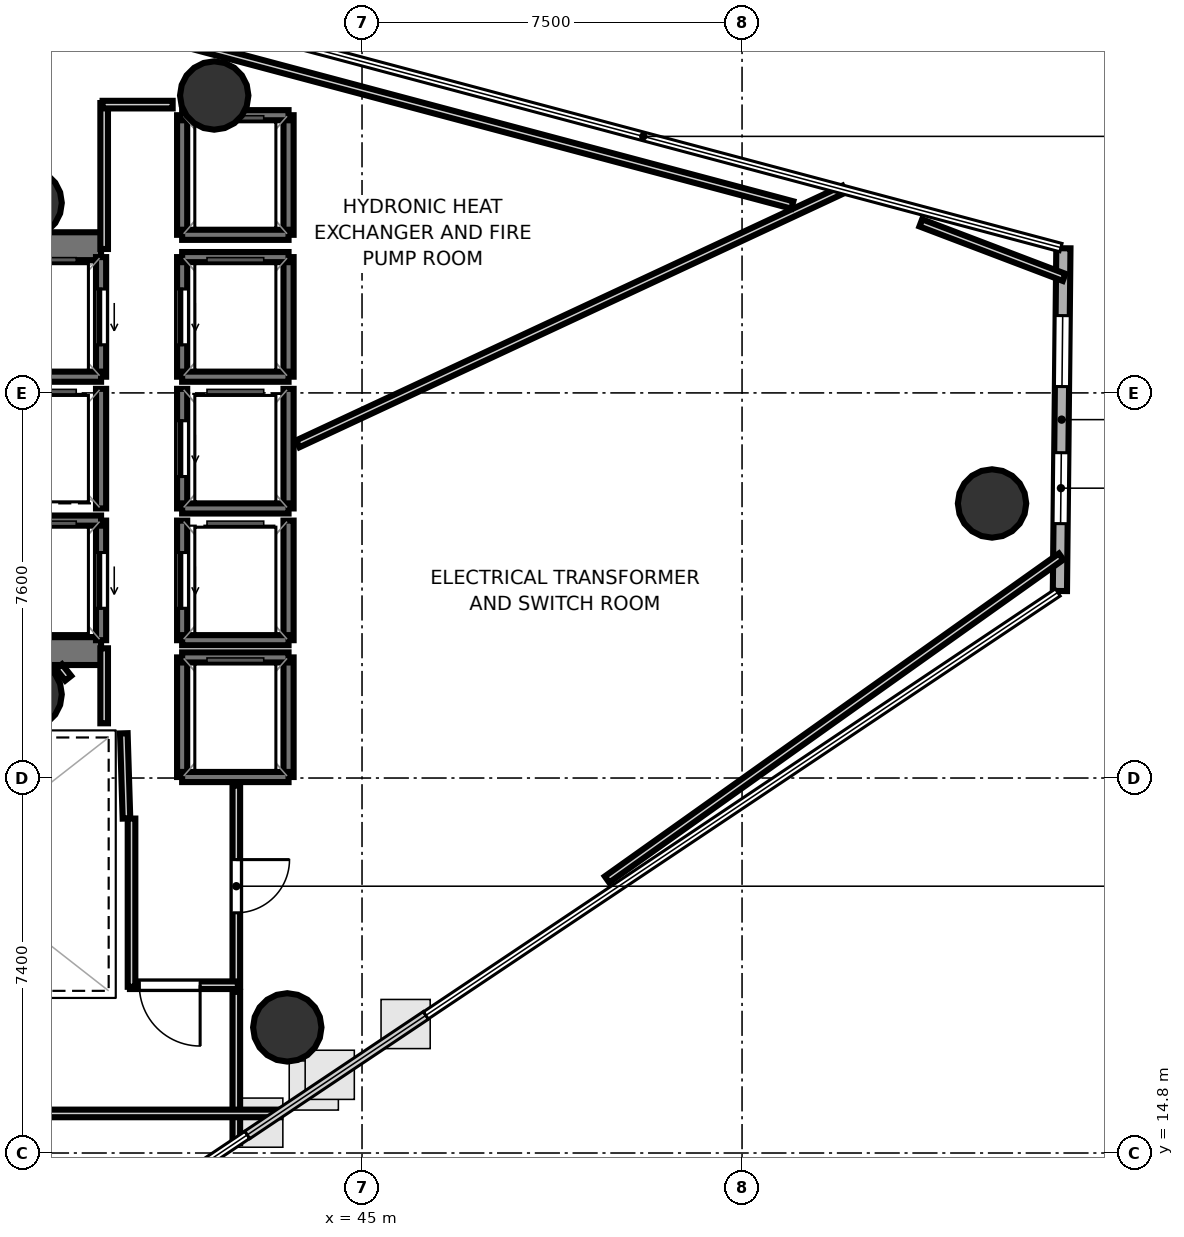
"""IFC4 building model, lengths in metres.
Left out: names, types, materials, properties, quantities, classifications, styles, units other than length and angle.
Written with IfcOpenShell. Run it as: python <this file> out.ifc"""

import sys

from ifc_helpers import new_model, si_unit, direction, frame, frame_2d, origin, origin_2d, place, context, subcontext, project, spatial, rectangle, hollow_circle, extrude, element, fill, save


model = new_model("IFC4")
c1 = context("Model", 3, precision=1e-05, world=origin(), true_north=direction((0.0, 1.0)))
c2 = subcontext(c1, "Body", "Model", "MODEL_VIEW")
j1 = project(units=[si_unit("LENGTHUNIT", "METRE"), si_unit("PLANEANGLEUNIT", "RADIAN")], contexts=[c1])
p1 = place(None, origin())
s1 = spatial("IfcSite", under=j1, at=p1, CompositionType="ELEMENT")
p2 = place(p1, origin())
s2 = spatial("IfcBuilding", under=s1, at=p2, CompositionType="ELEMENT")
p3 = place(p2, frame((0.0, 0.0, 184.6)))
s3 = spatial("IfcBuildingStorey", under=s2, at=p3, CompositionType="ELEMENT", Elevation=184.6)
p4 = place(p3, frame((29.23, 32.695, 0.0), z_axis=(0.0, 0.0, 1.0), x_axis=(1.0, 0.0, 0.0)))
e1 = element("IfcWall", 1, at=p4, inside=s3, PredefinedType="SHEAR", context=c2, shape_type="SweptSolid", body=[
    extrude(rectangle(XDim=10.62, YDim=0.55, at=frame_2d((5.31, 0.0))), origin(), (0.0, 0.0, 1.0), 4.42),
])
p5 = place(p4, frame((0.995, 0.0, 0.0)))
e2 = element("IfcOpeningElement", 2, at=p5, cuts=e1, PredefinedType="OPENING", context=c2, shape_type="SweptSolid", body=[
    extrude(rectangle(XDim=1.25, YDim=2.15, at=frame_2d((0.625, 1.075))), frame((0.0, 0.285, 0.0), z_axis=(0.0, -1.0, 0.0), x_axis=(1.0, 0.0, 0.0)), (0.0, 0.0, 1.0), 0.57),
])
p6 = place(p3, frame((29.23, 24.705, 0.0), z_axis=(0.0, 0.0, 1.0), x_axis=(1.0, 0.0, 0.0)))
e3 = element("IfcWall", 3, at=p6, inside=s3, PredefinedType="SHEAR", context=c2, shape_type="SweptSolid", body=[
    extrude(rectangle(XDim=10.62, YDim=0.55, at=frame_2d((5.31, 0.0))), origin(), (0.0, 0.0, 1.0), 4.42),
])
p7 = place(p6, frame((0.795, 0.0, 0.0)))
e4 = element("IfcOpeningElement", 4, at=p7, cuts=e3, PredefinedType="OPENING", context=c2, shape_type="SweptSolid", body=[
    extrude(rectangle(XDim=1.25, YDim=2.15, at=frame_2d((0.625, 1.075))), frame((0.0, 0.285, 0.0), z_axis=(0.0, -1.0, 0.0), x_axis=(1.0, 0.0, 0.0)), (0.0, 0.0, 1.0), 0.57),
])
for number, where, z_axis, x_axis in (
    (5, (38.4, 33.55, 0.0), (0.0, 0.0, 1.0), (1.0, 0.0, 0.0)),
    (6, (38.4, 23.85, 0.0), (0.0, 0.0, 1.0), (1.0, 0.0, 0.0)),
    (7, (57.434, 27.618, 0.0), (0.0, 0.0, 1.0), (1.0, 0.0, 0.0)),
    (8, (42.083, 35.669, 0.0), (0.0, 0.0, 1.0), (1.0, 0.0, 0.0)),
    (9, (43.525, 17.279, 0.0), (0.0, 0.0, 1.0), (1.0, 0.0, 0.0)),
):
    element("IfcColumn", number, at=place(p3, frame(where, z_axis=z_axis, x_axis=x_axis)), inside=s3, PredefinedType="COLUMN", context=c2, shape_type="SweptSolid", body=[
        extrude(hollow_circle(Radius=0.675, WallThickness=0.032, at=origin_2d()), origin(), (0.0, 0.0, 1.0), 4.6),
    ])
p8 = place(p3, frame((58.773, 25.891, 0.0), z_axis=(0.0, 0.0, 1.0), x_axis=(0.010178875598, 0.999948193904, 0.0)))
e10 = element("IfcWall", 10, at=p8, inside=s3, PredefinedType="SOLIDWALL", context=c2, shape_type="SweptSolid", body=[
    extrude(rectangle(XDim=6.764, YDim=0.28, at=frame_2d((3.382, 0.0))), origin(), (0.0, 0.0, 1.0), 4.42),
])
p9 = place(p8, frame((1.329, 0.0, 1.0)))
e11 = element("IfcOpeningElement", 11, at=p9, cuts=e10, PredefinedType="OPENING", context=c2, shape_type="SweptSolid", body=[
    extrude(rectangle(XDim=1.4, YDim=1.5, at=frame_2d((0.7, 0.75))), frame((0.0, 0.15, 0.0), z_axis=(0.0, -1.0, 0.0), x_axis=(1.0, 0.0, 0.0)), (0.0, 0.0, 1.0), 0.3),
])
p10 = place(p8, frame((4.035, 0.0, 1.0)))
e12 = element("IfcOpeningElement", 12, at=p10, cuts=e10, PredefinedType="OPENING", context=c2, shape_type="SweptSolid", body=[
    extrude(rectangle(XDim=1.4, YDim=1.5, at=frame_2d((0.7, 0.75))), frame((0.0, 0.15, 0.0), z_axis=(0.0, -1.0, 0.0), x_axis=(1.0, 0.0, 0.0)), (0.0, 0.0, 1.0), 0.3),
])
p11 = place(p3, frame((39.85, 30.12, 0.0), z_axis=(0.0, 0.0, 1.0), x_axis=(0.0, 1.0, 0.0)))
e13 = element("IfcWall", 13, at=p11, inside=s3, PredefinedType="SOLIDWALL", context=c2, shape_type="SweptSolid", body=[
    extrude(rectangle(XDim=2.36, YDim=0.2, at=frame_2d((1.18, 0.0))), origin(), (0.0, 0.0, 1.0), 4.42),
])
p12 = place(p11, frame((0.63, 0.0, 0.0)))
e14 = element("IfcOpeningElement", 14, at=p12, cuts=e13, PredefinedType="OPENING", context=c2, shape_type="SweptSolid", body=[
    extrude(rectangle(XDim=1.1, YDim=2.15, at=frame_2d((0.55, 1.075))), frame((0.0, 0.11, 0.0), z_axis=(0.0, -1.0, 0.0), x_axis=(1.0, 0.0, 0.0)), (0.0, 0.0, 1.0), 0.22),
])
p13 = place(p3, frame((37.75, 30.12, 0.0), z_axis=(0.0, 0.0, 1.0), x_axis=(1.0, 0.0, 0.0)))
e15 = element("IfcWall", 15, at=p13, inside=s3, PredefinedType="SOLIDWALL", context=c2, shape_type="SweptSolid", body=[
    extrude(rectangle(XDim=2.1, YDim=0.2, at=frame_2d((1.05, 0.0))), origin(), (0.0, 0.0, 1.0), 4.42),
])
p14 = place(p3, frame((39.85, 24.92, 0.0), z_axis=(0.0, 0.0, 1.0), x_axis=(0.0, 1.0, 0.0)))
e16 = element("IfcWall", 16, at=p14, inside=s3, PredefinedType="SOLIDWALL", context=c2, shape_type="SweptSolid", body=[
    extrude(rectangle(XDim=2.36, YDim=0.2, at=frame_2d((1.18, 0.0))), origin(), (0.0, 0.0, 1.0), 4.42),
])
p15 = place(p14, frame((0.63, 0.0, 0.0)))
e17 = element("IfcOpeningElement", 17, at=p15, cuts=e16, PredefinedType="OPENING", context=c2, shape_type="SweptSolid", body=[
    extrude(rectangle(XDim=1.1, YDim=2.15, at=frame_2d((0.55, 1.075))), frame((0.0, 0.11, 0.0), z_axis=(0.0, -1.0, 0.0), x_axis=(1.0, 0.0, 0.0)), (0.0, 0.0, 1.0), 0.22),
])
p16 = place(p3, frame((37.75, 27.28, 0.0), z_axis=(0.0, 0.0, 1.0), x_axis=(1.0, 0.0, 0.0)))
e18 = element("IfcWall", 18, at=p16, inside=s3, PredefinedType="SOLIDWALL", context=c2, shape_type="SweptSolid", body=[
    extrude(rectangle(XDim=2.1, YDim=0.2, at=frame_2d((1.05, 0.0))), origin(), (0.0, 0.0, 1.0), 4.42),
])
p17 = place(p3, frame((43.55, 30.12, 0.0), z_axis=(0.0, 0.0, 1.0), x_axis=(0.0, 1.0, 0.0)))
e19 = element("IfcWall", 19, at=p17, inside=s3, PredefinedType="SOLIDWALL", context=c2, shape_type="SweptSolid", body=[
    extrude(rectangle(XDim=2.36, YDim=0.2, at=frame_2d((1.18, 0.0))), origin(), (0.0, 0.0, 1.0), 4.42),
])
p18 = place(p3, frame((41.45, 30.12, 0.0), z_axis=(0.0, 0.0, 1.0), x_axis=(0.0, 1.0, 0.0)))
e20 = element("IfcWall", 20, at=p18, inside=s3, PredefinedType="SOLIDWALL", context=c2, shape_type="SweptSolid", body=[
    extrude(rectangle(XDim=2.36, YDim=0.2, at=frame_2d((1.18, 0.0))), origin(), (0.0, 0.0, 1.0), 4.42),
])
p19 = place(p18, frame((0.63, 0.0, 0.0)))
e21 = element("IfcOpeningElement", 21, at=p19, cuts=e20, PredefinedType="OPENING", context=c2, shape_type="SweptSolid", body=[
    extrude(rectangle(XDim=1.1, YDim=2.15, at=frame_2d((0.55, 1.075))), frame((0.0, 0.11, 0.0), z_axis=(0.0, -1.0, 0.0), x_axis=(1.0, 0.0, 0.0)), (0.0, 0.0, 1.0), 0.22),
])
for number, where, z_axis, x_axis in (
    (22, (41.45, 32.48, 0.0), (0.0, 0.0, 1.0), (1.0, 0.0, 0.0)),
    (23, (41.45, 30.12, 0.0), (0.0, 0.0, 1.0), (1.0, 0.0, 0.0)),
):
    element("IfcWall", number, at=place(p3, frame(where, z_axis=z_axis, x_axis=x_axis)), inside=s3, PredefinedType="SOLIDWALL", context=c2, shape_type="SweptSolid", body=[
        extrude(rectangle(XDim=2.1, YDim=0.2, at=frame_2d((1.05, 0.0))), origin(), (0.0, 0.0, 1.0), 4.42),
    ])
p20 = place(p3, frame((43.55, 27.52, 0.0), z_axis=(0.0, 0.0, 1.0), x_axis=(0.0, 1.0, 0.0)))
e24 = element("IfcWall", 24, at=p20, inside=s3, PredefinedType="SOLIDWALL", context=c2, shape_type="SweptSolid", body=[
    extrude(rectangle(XDim=2.36, YDim=0.2, at=frame_2d((1.18, 0.0))), origin(), (0.0, 0.0, 1.0), 4.42),
])
p21 = place(p3, frame((41.45, 27.52, 0.0), z_axis=(0.0, 0.0, 1.0), x_axis=(0.0, 1.0, 0.0)))
e25 = element("IfcWall", 25, at=p21, inside=s3, PredefinedType="SOLIDWALL", context=c2, shape_type="SweptSolid", body=[
    extrude(rectangle(XDim=2.36, YDim=0.2, at=frame_2d((1.18, 0.0))), origin(), (0.0, 0.0, 1.0), 4.42),
])
p22 = place(p21, frame((0.63, 0.0, 0.0)))
e26 = element("IfcOpeningElement", 26, at=p22, cuts=e25, PredefinedType="OPENING", context=c2, shape_type="SweptSolid", body=[
    extrude(rectangle(XDim=1.1, YDim=2.15, at=frame_2d((0.55, 1.075))), frame((0.0, 0.11, 0.0), z_axis=(0.0, -1.0, 0.0), x_axis=(1.0, 0.0, 0.0)), (0.0, 0.0, 1.0), 0.22),
])
p23 = place(p3, frame((41.45, 27.52, 0.0), z_axis=(0.0, 0.0, 1.0), x_axis=(1.0, 0.0, 0.0)))
e27 = element("IfcWall", 27, at=p23, inside=s3, PredefinedType="SOLIDWALL", context=c2, shape_type="SweptSolid", body=[
    extrude(rectangle(XDim=2.1, YDim=0.2, at=frame_2d((1.05, 0.0))), origin(), (0.0, 0.0, 1.0), 4.42),
])
p24 = place(p3, frame((43.55, 24.92, 0.0), z_axis=(0.0, 0.0, 1.0), x_axis=(0.0, 1.0, 0.0)))
e28 = element("IfcWall", 28, at=p24, inside=s3, PredefinedType="SOLIDWALL", context=c2, shape_type="SweptSolid", body=[
    extrude(rectangle(XDim=2.36, YDim=0.2, at=frame_2d((1.18, 0.0))), origin(), (0.0, 0.0, 1.0), 4.42),
])
p25 = place(p3, frame((41.45, 24.92, 0.0), z_axis=(0.0, 0.0, 1.0), x_axis=(0.0, 1.0, 0.0)))
e29 = element("IfcWall", 29, at=p25, inside=s3, PredefinedType="SOLIDWALL", context=c2, shape_type="SweptSolid", body=[
    extrude(rectangle(XDim=2.36, YDim=0.2, at=frame_2d((1.18, 0.0))), origin(), (0.0, 0.0, 1.0), 4.42),
])
p26 = place(p25, frame((0.63, 0.0, 0.0)))
e30 = element("IfcOpeningElement", 30, at=p26, cuts=e29, PredefinedType="OPENING", context=c2, shape_type="SweptSolid", body=[
    extrude(rectangle(XDim=1.1, YDim=2.15, at=frame_2d((0.55, 1.075))), frame((0.0, 0.11, 0.0), z_axis=(0.0, -1.0, 0.0), x_axis=(1.0, 0.0, 0.0)), (0.0, 0.0, 1.0), 0.22),
])
p27 = place(p3, frame((41.45, 24.92, 0.0), z_axis=(0.0, 0.0, 1.0), x_axis=(1.0, 0.0, 0.0)))
e31 = element("IfcWall", 31, at=p27, inside=s3, PredefinedType="SOLIDWALL", context=c2, shape_type="SweptSolid", body=[
    extrude(rectangle(XDim=2.1, YDim=0.2, at=frame_2d((1.05, 0.0))), origin(), (0.0, 0.0, 1.0), 4.42),
])
p28 = place(p3, frame((39.85, 27.52, 0.0), z_axis=(0.0, 0.0, 1.0), x_axis=(0.0, 1.0, 0.0)))
e32 = element("IfcWall", 32, at=p28, inside=s3, PredefinedType="SOLIDWALL", context=c2, shape_type="SweptSolid", body=[
    extrude(rectangle(XDim=2.36, YDim=0.2, at=frame_2d((1.18, 0.0))), origin(), (0.0, 0.0, 1.0), 4.42),
])
for number, where, z_axis, x_axis in (
    (33, (43.55, 22.22, 0.0), (0.0, 0.0, 1.0), (0.0, 1.0, 0.0)),
    (34, (41.45, 22.22, 0.0), (0.0, 0.0, 1.0), (0.0, 1.0, 0.0)),
):
    element("IfcWall", number, at=place(p3, frame(where, z_axis=z_axis, x_axis=x_axis)), inside=s3, PredefinedType="SOLIDWALL", context=c2, shape_type="SweptSolid", body=[
        extrude(rectangle(XDim=2.36, YDim=0.2, at=frame_2d((1.18, 0.0))), origin(), (0.0, 0.0, 1.0), 4.42),
    ])
for number, where, z_axis, x_axis in (
    (35, (41.45, 24.58, 0.0), (0.0, 0.0, 1.0), (1.0, 0.0, 0.0)),
    (36, (41.45, 22.22, 0.0), (0.0, 0.0, 1.0), (1.0, 0.0, 0.0)),
):
    element("IfcWall", number, at=place(p3, frame(where, z_axis=z_axis, x_axis=x_axis)), inside=s3, PredefinedType="SOLIDWALL", context=c2, shape_type="SweptSolid", body=[
        extrude(rectangle(XDim=2.1, YDim=0.2, at=frame_2d((1.05, 0.0))), origin(), (0.0, 0.0, 1.0), 4.42),
    ])
for number, where, z_axis, x_axis in (
    (37, (43.55, 32.92, 0.0), (0.0, 0.0, 1.0), (0.0, 1.0, 0.0)),
    (38, (41.45, 32.92, 0.0), (0.0, 0.0, 1.0), (0.0, 1.0, 0.0)),
):
    element("IfcWall", number, at=place(p3, frame(where, z_axis=z_axis, x_axis=x_axis)), inside=s3, PredefinedType="SOLIDWALL", context=c2, shape_type="SweptSolid", body=[
        extrude(rectangle(XDim=2.36, YDim=0.2, at=frame_2d((1.18, 0.0))), origin(), (0.0, 0.0, 1.0), 4.42),
    ])
for number, where, z_axis, x_axis in (
    (39, (41.45, 35.28, 0.0), (0.0, 0.0, 1.0), (1.0, 0.0, 0.0)),
    (40, (41.45, 32.92, 0.0), (0.0, 0.0, 1.0), (1.0, 0.0, 0.0)),
):
    element("IfcWall", number, at=place(p3, frame(where, z_axis=z_axis, x_axis=x_axis)), inside=s3, PredefinedType="SOLIDWALL", context=c2, shape_type="SweptSolid", body=[
        extrude(rectangle(XDim=2.1, YDim=0.2, at=frame_2d((1.05, 0.0))), origin(), (0.0, 0.0, 1.0), 4.42),
    ])
p29 = place(p3, frame((40.351, 21.401, 0.0), z_axis=(0.0, 0.0, 1.0), x_axis=(-0.031058045979, 0.999517582527, 0.0)))
e41 = element("IfcWall", 41, at=p29, inside=s3, PredefinedType="PARTITIONING", context=c2, shape_type="SweptSolid", body=[
    extrude(rectangle(XDim=1.682, YDim=0.15, at=frame_2d((0.841, 0.0))), origin(), (0.0, 0.0, 1.0), 2.94),
])
p30 = place(p3, frame((39.911, 23.28, 0.0), z_axis=(0.0, 0.0, 1.0), x_axis=(0.0, 1.0, 0.0)))
e42 = element("IfcWall", 42, at=p30, inside=s3, PredefinedType="PARTITIONING", context=c2, shape_type="SweptSolid", body=[
    extrude(rectangle(XDim=1.48, YDim=0.15, at=frame_2d((0.74, 0.0))), origin(), (0.0, 0.0, 1.0), 2.94),
])
p31 = place(p3, frame((39.911, 32.64, 0.0), z_axis=(0.0, 0.0, 1.0), x_axis=(0.0, 1.0, 0.0)))
e43 = element("IfcWall", 43, at=p31, inside=s3, PredefinedType="PARTITIONING", context=c2, shape_type="SweptSolid", body=[
    extrude(rectangle(XDim=2.88, YDim=0.15, at=frame_2d((1.44, 0.0))), origin(), (0.0, 0.0, 1.0), 2.94),
])
p32 = place(p3, frame((39.88, 35.489, 0.0), z_axis=(0.0, 0.0, 1.0), x_axis=(1.0, 0.0, 0.0)))
e44 = element("IfcWall", 44, at=p32, inside=s3, PredefinedType="PARTITIONING", context=c2, shape_type="SweptSolid", body=[
    extrude(rectangle(XDim=1.383, YDim=0.15, at=frame_2d((0.691, 0.0))), origin(), (0.0, 0.0, 1.0), 2.94),
])
p33 = place(p3, frame((42.519, 22.05, 0.0), z_axis=(0.0, 0.0, 1.0), x_axis=(0.0, -1.0, 0.0)))
e45 = element("IfcWall", 45, at=p33, inside=s3, PredefinedType="PARTITIONING", context=c2, shape_type="SweptSolid", body=[
    extrude(rectangle(XDim=3.97, YDim=0.15, at=frame_2d((1.985, 0.0))), origin(), (0.0, 0.0, 1.0), 2.94),
])
p34 = place(p33, frame((1.46, 0.0, 0.0)))
e46 = element("IfcOpeningElement", 46, at=p34, cuts=e45, PredefinedType="OPENING", context=c2, shape_type="SweptSolid", body=[
    extrude(rectangle(XDim=1.05, YDim=2.15, at=frame_2d((0.525, 1.075))), frame((0.0, 0.085, 0.0), z_axis=(0.0, -1.0, 0.0), x_axis=(1.0, 0.0, 0.0)), (0.0, 0.0, 1.0), 0.17),
])
p35 = place(p3, frame((42.55, 18.111, 0.0), z_axis=(0.0, 0.0, 1.0), x_axis=(-1.0, 0.0, 0.0)))
e47 = element("IfcWall", 47, at=p35, inside=s3, PredefinedType="PARTITIONING", context=c2, shape_type="SweptSolid", body=[
    extrude(rectangle(XDim=2.13, YDim=0.15, at=frame_2d((1.065, 0.0))), origin(), (0.0, 0.0, 1.0), 2.94),
])
p36 = place(p35, frame((0.745, 0.0, 0.0)))
e48 = element("IfcOpeningElement", 48, at=p36, cuts=e47, PredefinedType="OPENING", context=c2, shape_type="SweptSolid", body=[
    extrude(rectangle(XDim=1.2, YDim=2.15, at=frame_2d((0.6, 1.075))), frame((0.0, 0.085, 0.0), z_axis=(0.0, -1.0, 0.0), x_axis=(1.0, 0.0, 0.0)), (0.0, 0.0, 1.0), 0.17),
])
p37 = place(p3, frame((40.451, 18.08, 0.0), z_axis=(0.0, 0.0, 1.0), x_axis=(0.0, 1.0, 0.0)))
e49 = element("IfcWall", 49, at=p37, inside=s3, PredefinedType="PARTITIONING", context=c2, shape_type="SweptSolid", body=[
    extrude(rectangle(XDim=3.32, YDim=0.15, at=frame_2d((1.66, 0.0))), origin(), (0.0, 0.0, 1.0), 2.94),
])
p38 = place(p3, frame((39.202, 24.169, 0.0), z_axis=(0.0, 0.0, 1.0), x_axis=(-0.622453876994, 0.782656483405, 0.0)))
e50 = element("IfcWall", 50, at=p38, inside=s3, PredefinedType="PARTITIONING", context=c2, shape_type="SweptSolid", body=[
    extrude(rectangle(XDim=0.292, YDim=0.15, at=frame_2d((0.146, 0.0))), origin(), (0.0, 0.0, 1.0), 2.94),
])
p39 = place(p3, frame((42.519, 17.98, 0.0), z_axis=(0.0, 0.0, 1.0), x_axis=(0.0, -1.0, 0.0)))
e51 = element("IfcWall", 51, at=p39, inside=s3, PredefinedType="PARTITIONING", context=c2, shape_type="SweptSolid", body=[
    extrude(rectangle(XDim=2.987, YDim=0.15, at=frame_2d((1.494, 0.0))), origin(), (0.0, 0.0, 1.0), 2.94),
])
p40 = place(p3, frame((43.388, 15.581, 0.0), z_axis=(0.0, 0.0, 1.0), x_axis=(-1.0, 0.0, 0.0)))
e52 = element("IfcWall", 52, at=p40, inside=s3, PredefinedType="PARTITIONING", context=c2, shape_type="SweptSolid", body=[
    extrude(rectangle(XDim=13.338, YDim=0.15, at=frame_2d((6.669, 0.0))), origin(), (0.0, 0.0, 1.0), 2.94),
])
p41 = place(p40, frame((8.292, 0.0, 0.0)))
e53 = element("IfcOpeningElement", 53, at=p41, cuts=e52, PredefinedType="OPENING", context=c2, shape_type="SweptSolid", body=[
    extrude(rectangle(XDim=1.05, YDim=2.15, at=frame_2d((0.525, 1.075))), frame((0.0, 0.085, 0.0), z_axis=(0.0, -1.0, 0.0), x_axis=(1.0, 0.0, 0.0)), (0.0, 0.0, 1.0), 0.17),
])
p42 = place(p3, frame((43.733, 28.795, 0.0), z_axis=(0.0, 0.0, 1.0), x_axis=(0.906312645593, 0.422607842376, 0.0)))
e54 = element("IfcWall", 54, at=p42, inside=s3, PredefinedType="PARTITIONING", context=c2, shape_type="SweptSolid", body=[
    extrude(rectangle(XDim=11.892, YDim=0.15, at=frame_2d((5.946, 0.0))), origin(), (0.0, 0.0, 1.0), 2.94),
])
p43 = place(p3, frame((56.027, 33.156, 0.0), z_axis=(0.0, 0.0, 1.0), x_axis=(0.934744452072, -0.355320713328, 0.0)))
e55 = element("IfcWall", 55, at=p43, inside=s3, PredefinedType="PARTITIONING", context=c2, shape_type="SweptSolid", body=[
    extrude(rectangle(XDim=3.025, YDim=0.15, at=frame_2d((1.513, 0.0))), origin(), (0.0, 0.0, 1.0), 2.94),
])
p44 = place(p3, frame((58.796, 26.57, 0.0), z_axis=(0.0, 0.0, 1.0), x_axis=(-0.81498282219, -0.579485115887, 0.0)))
e56 = element("IfcWall", 56, at=p44, inside=s3, PredefinedType="PARTITIONING", context=c2, shape_type="SweptSolid", body=[
    extrude(rectangle(XDim=10.995, YDim=0.15, at=frame_2d((5.498, 0.0))), origin(), (0.0, 0.0, 1.0), 2.94),
])
p45 = place(p3, frame((36.922, 37.922, 0.0), z_axis=(0.0, 0.0, 1.0), x_axis=(0.966315469674, -0.257360473013, 0.0)))
e57 = element("IfcWall", 57, at=p45, inside=s3, PredefinedType="PARTITIONING", context=c2, shape_type="SweptSolid", body=[
    extrude(rectangle(XDim=17.148, YDim=0.15, at=frame_2d((8.574, 0.0))), origin(), (0.0, 0.0, 1.0), 2.94),
])
p46 = place(p12, origin())
e58 = element("IfcDoor", 58, at=p46, inside=s3, OperationType="SLIDING_TO_LEFT", PredefinedType="DOOR", context=c2, shape_type="SweptSolid", body=[
    extrude(rectangle(XDim=1.1, YDim=2.15, at=frame_2d((0.55, 1.075))), frame((0.0, 0.025, 0.0), z_axis=(0.0, -1.0, 0.0), x_axis=(1.0, 0.0, 0.0)), (0.0, 0.0, 1.0), 0.05),
])
fill(e14, e58)
p47 = place(p15, origin())
e59 = element("IfcDoor", 59, at=p47, inside=s3, OperationType="SLIDING_TO_LEFT", PredefinedType="DOOR", context=c2, shape_type="SweptSolid", body=[
    extrude(rectangle(XDim=1.1, YDim=2.15, at=frame_2d((0.55, 1.075))), frame((0.0, 0.025, 0.0), z_axis=(0.0, -1.0, 0.0), x_axis=(1.0, 0.0, 0.0)), (0.0, 0.0, 1.0), 0.05),
])
fill(e17, e59)
p48 = place(p19, origin())
e60 = element("IfcDoor", 60, at=p48, inside=s3, OperationType="SLIDING_TO_LEFT", PredefinedType="DOOR", context=c2, shape_type="SweptSolid", body=[
    extrude(rectangle(XDim=1.1, YDim=2.15, at=frame_2d((0.55, 1.075))), frame((0.0, 0.025, 0.0), z_axis=(0.0, -1.0, 0.0), x_axis=(1.0, 0.0, 0.0)), (0.0, 0.0, 1.0), 0.05),
])
fill(e21, e60)
p49 = place(p22, origin())
e61 = element("IfcDoor", 61, at=p49, inside=s3, OperationType="SLIDING_TO_LEFT", PredefinedType="DOOR", context=c2, shape_type="SweptSolid", body=[
    extrude(rectangle(XDim=1.1, YDim=2.15, at=frame_2d((0.55, 1.075))), frame((0.0, 0.025, 0.0), z_axis=(0.0, -1.0, 0.0), x_axis=(1.0, 0.0, 0.0)), (0.0, 0.0, 1.0), 0.05),
])
fill(e26, e61)
p50 = place(p26, origin())
e62 = element("IfcDoor", 62, at=p50, inside=s3, OperationType="SLIDING_TO_LEFT", PredefinedType="DOOR", context=c2, shape_type="SweptSolid", body=[
    extrude(rectangle(XDim=1.1, YDim=2.15, at=frame_2d((0.55, 1.075))), frame((0.0, 0.025, 0.0), z_axis=(0.0, -1.0, 0.0), x_axis=(1.0, 0.0, 0.0)), (0.0, 0.0, 1.0), 0.05),
])
fill(e30, e62)
p51 = place(p36, origin())
e63 = element("IfcDoor", 63, at=p51, inside=s3, OperationType="SINGLE_SWING_LEFT", PredefinedType="DOOR", context=c2, shape_type="SweptSolid", body=[
    extrude(rectangle(XDim=1.2, YDim=2.15, at=frame_2d((0.6, 1.075))), frame((0.0, 0.025, 0.0), z_axis=(0.0, -1.0, 0.0), x_axis=(1.0, 0.0, 0.0)), (0.0, 0.0, 1.0), 0.05),
])
fill(e48, e63)
p52 = place(p34, origin())
e64 = element("IfcDoor", 64, at=p52, inside=s3, OperationType="SINGLE_SWING_LEFT", PredefinedType="DOOR", context=c2, shape_type="SweptSolid", body=[
    extrude(rectangle(XDim=1.05, YDim=2.15, at=frame_2d((0.525, 1.075))), frame((0.0, 0.025, 0.0), z_axis=(0.0, -1.0, 0.0), x_axis=(1.0, 0.0, 0.0)), (0.0, 0.0, 1.0), 0.05),
])
fill(e46, e64)
p53 = place(p9, origin())
e65 = element("IfcWindow", 65, at=p53, inside=s3, PartitioningType="SINGLE_PANEL", PredefinedType="WINDOW", context=c2, shape_type="SweptSolid", body=[
    extrude(rectangle(XDim=1.4, YDim=1.5, at=frame_2d((0.7, 0.75))), frame((0.0, 0.03, 0.0), z_axis=(0.0, -1.0, 0.0), x_axis=(1.0, 0.0, 0.0)), (0.0, 0.0, 1.0), 0.06),
])
fill(e11, e65)
p54 = place(p10, origin())
e66 = element("IfcWindow", 66, at=p54, inside=s3, PartitioningType="SINGLE_PANEL", PredefinedType="WINDOW", context=c2, shape_type="SweptSolid", body=[
    extrude(rectangle(XDim=1.4, YDim=1.5, at=frame_2d((0.7, 0.75))), frame((0.0, 0.03, 0.0), z_axis=(0.0, -1.0, 0.0), x_axis=(1.0, 0.0, 0.0)), (0.0, 0.0, 1.0), 0.06),
])
fill(e12, e66)
save(model, sys.argv[1])
